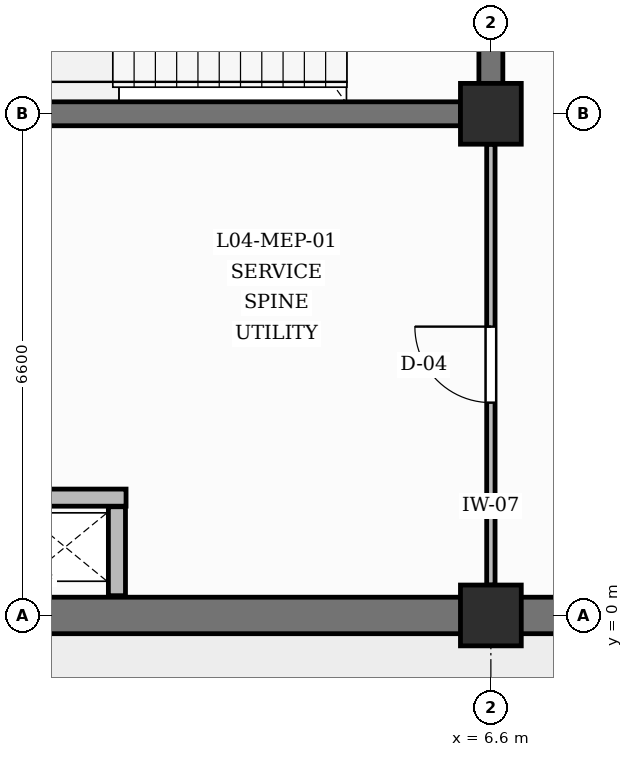
"""IFC4 building model, lengths in metres.
Left out: names, types, materials, properties, quantities, classifications, styles, units other than length and angle.
Written with IfcOpenShell. Run it as: python <this file> out.ifc"""

import sys

from ifc_helpers import new_model, si_unit, direction, frame, frame_2d, origin, origin_2d, place, context, subcontext, project, spatial, rectangle, extrude, element, fill, save


model = new_model("IFC4")
c1 = context("Model", 3, precision=1e-05, world=origin(), true_north=direction((0.0, 1.0)))
c2 = subcontext(c1, "Body", "Model", "MODEL_VIEW")
j1 = project(units=[si_unit("LENGTHUNIT", "METRE"), si_unit("PLANEANGLEUNIT", "RADIAN")], contexts=[c1])
p1 = place(None, origin())
s1 = spatial("IfcSite", under=j1, at=p1, CompositionType="ELEMENT")
p2 = place(p1, origin())
s2 = spatial("IfcBuilding", under=s1, at=p2, CompositionType="ELEMENT")
p3 = place(p2, frame((0.0, 0.0, 18.6)))
s3 = spatial("IfcBuildingStorey", under=s2, at=p3, CompositionType="ELEMENT", Elevation=18.6)
for number, where, z_axis, x_axis in (
    (1, (6.6, 0.0, 0.0), (0.0, 0.0, 1.0), (1.0, 0.0, 0.0)),
    (2, (6.6, 6.6, 0.0), (0.0, 0.0, 1.0), (1.0, 0.0, 0.0)),
):
    element("IfcColumn", number, at=place(p3, frame(where, z_axis=z_axis, x_axis=x_axis)), inside=s3, PredefinedType="COLUMN", context=c2, shape_type="SweptSolid", body=[
        extrude(rectangle(XDim=0.8, YDim=0.8, at=origin_2d()), origin(), (0.0, 0.0, 1.0), 4.2),
    ])
for number, where, z_axis, x_axis in (
    (3, (0.4, 0.0, 0.0), (0.0, 0.0, 1.0), (1.0, 0.0, 0.0)),
    (4, (7.0, 0.0, 0.0), (0.0, 0.0, 1.0), (1.0, 0.0, 0.0)),
):
    element("IfcWall", number, at=place(p3, frame(where, z_axis=z_axis, x_axis=x_axis)), inside=s3, PredefinedType="SOLIDWALL", context=c2, shape_type="SweptSolid", body=[
        extrude(rectangle(XDim=5.8, YDim=0.48, at=frame_2d((2.9, 0.0))), origin(), (0.0, 0.0, 1.0), 3.26),
    ])
p4 = place(p3, frame((0.4, 6.6, 0.0), z_axis=(0.0, 0.0, 1.0), x_axis=(1.0, 0.0, 0.0)))
e5 = element("IfcWall", 5, at=p4, inside=s3, PredefinedType="SHEAR", context=c2, shape_type="SweptSolid", body=[
    extrude(rectangle(XDim=5.8, YDim=0.315, at=frame_2d((2.9, 0.0))), origin(), (0.0, 0.0, 1.0), 3.16),
])
p5 = place(p3, frame((6.6, 7.0, 0.0), z_axis=(0.0, 0.0, 1.0), x_axis=(0.0, 1.0, 0.0)))
e6 = element("IfcWall", 6, at=p5, inside=s3, PredefinedType="SHEAR", context=c2, shape_type="SweptSolid", body=[
    extrude(rectangle(XDim=5.8, YDim=0.315, at=frame_2d((2.9, 0.0))), origin(), (0.0, 0.0, 1.0), 3.16),
])
p6 = place(p5, frame((2.325, 0.0, 0.0)))
e7 = element("IfcOpeningElement", 7, at=p6, cuts=e6, PredefinedType="OPENING", context=c2, shape_type="SweptSolid", body=[
    extrude(rectangle(XDim=1.15, YDim=2.2, at=frame_2d((0.575, 1.1))), frame((0.0, 0.167, 0.0), z_axis=(0.0, -1.0, 0.0), x_axis=(1.0, 0.0, 0.0)), (0.0, 0.0, 1.0), 0.335),
])
p7 = place(p3, frame((1.68, 0.26, 0.0), z_axis=(0.0, 0.0, 1.0), x_axis=(0.0, 1.0, 0.0)))
e8 = element("IfcWall", 8, at=p7, inside=s3, PredefinedType="PARTITIONING", context=c2, shape_type="SweptSolid", body=[
    extrude(rectangle(XDim=1.17, YDim=0.225, at=frame_2d((0.585, 0.0))), origin(), (0.0, 0.0, 1.0), 3.86),
])
p8 = place(p3, frame((0.26, 1.55, 0.0), z_axis=(0.0, 0.0, 1.0), x_axis=(1.0, 0.0, 0.0)))
e9 = element("IfcWall", 9, at=p8, inside=s3, PredefinedType="PARTITIONING", context=c2, shape_type="SweptSolid", body=[
    extrude(rectangle(XDim=1.54, YDim=0.225, at=frame_2d((0.77, 0.0))), origin(), (0.0, 0.0, 1.0), 3.86),
])
p9 = place(p3, frame((6.6, 0.4, 0.0), z_axis=(0.0, 0.0, 1.0), x_axis=(0.0, 1.0, 0.0)))
e10 = element("IfcWall", 10, at=p9, inside=s3, PredefinedType="PARTITIONING", context=c2, shape_type="SweptSolid", body=[
    extrude(rectangle(XDim=5.8, YDim=0.11, at=frame_2d((2.9, 0.0))), origin(), (0.0, 0.0, 1.0), 3.16),
])
p10 = place(p9, frame((2.4, 0.0, 0.0)))
e11 = element("IfcOpeningElement", 11, at=p10, cuts=e10, PredefinedType="OPENING", context=c2, shape_type="SweptSolid", body=[
    extrude(rectangle(XDim=1.0, YDim=2.1, at=frame_2d((0.5, 1.05))), frame((0.0, 0.065, 0.0), z_axis=(0.0, -1.0, 0.0), x_axis=(1.0, 0.0, 0.0)), (0.0, 0.0, 1.0), 0.13),
])
p11 = place(p10, origin())
e12 = element("IfcDoor", 12, at=p11, inside=s3, OperationType="SINGLE_SWING_RIGHT", PredefinedType="DOOR", context=c2, shape_type="SweptSolid", body=[
    extrude(rectangle(XDim=1.0, YDim=2.1, at=frame_2d((0.5, 1.05))), frame((0.0, 0.025, 0.0), z_axis=(0.0, -1.0, 0.0), x_axis=(1.0, 0.0, 0.0)), (0.0, 0.0, 1.0), 0.05),
])
fill(e11, e12)
save(model, sys.argv[1])
